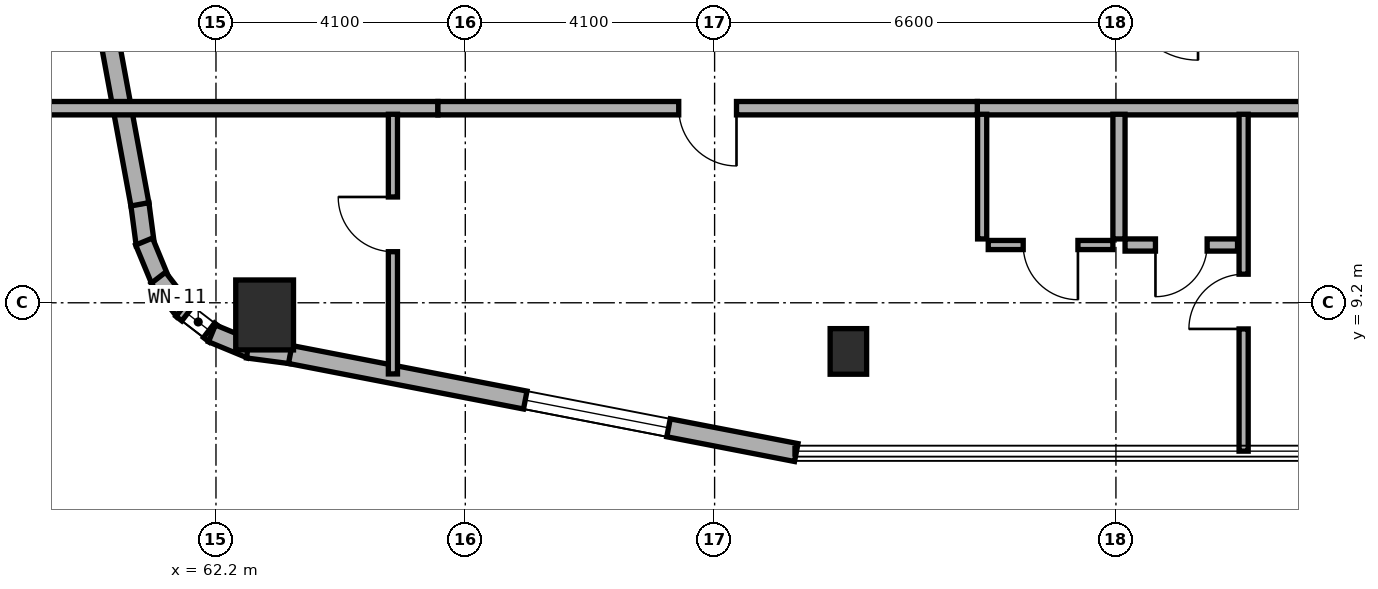
"""IFC4 building model, lengths in metres.
Left out: names, types, materials, properties, quantities, classifications, styles, units other than length and angle.
Written with IfcOpenShell. Run it as: python <this file> out.ifc"""

import sys

from ifc_helpers import new_model, si_unit, direction, frame, frame_2d, origin, origin_2d, place, context, subcontext, project, spatial, rectangle, extrude, element, fill, save


model = new_model("IFC4")
c1 = context("Model", 3, precision=1e-05, world=origin(), true_north=direction((0.0, 1.0)))
c2 = subcontext(c1, "Body", "Model", "MODEL_VIEW")
j1 = project(units=[si_unit("LENGTHUNIT", "METRE"), si_unit("PLANEANGLEUNIT", "RADIAN")], contexts=[c1])
p1 = place(None, origin())
s1 = spatial("IfcSite", under=j1, at=p1, CompositionType="ELEMENT")
p2 = place(p1, origin())
s2 = spatial("IfcBuilding", under=s1, at=p2, CompositionType="ELEMENT")
p3 = place(p2, frame((0.0, 0.0, 83.5)))
s3 = spatial("IfcBuildingStorey", under=s2, at=p3, CompositionType="ELEMENT", Elevation=83.5)
p4 = place(p3, frame((72.6, 8.4, 0.0), z_axis=(0.0, 0.0, 1.0), x_axis=(1.0, 0.0, 0.0)))
e1 = element("IfcColumn", 1, at=p4, inside=s3, PredefinedType="COLUMN", context=c2, shape_type="SweptSolid", body=[
    extrude(rectangle(XDim=0.6, YDim=0.75, at=origin_2d()), origin(), (0.0, 0.0, 1.0), 3.5),
])
p5 = place(p3, frame((63.0, 9.0, 0.0), z_axis=(0.0, 0.0, 1.0), x_axis=(1.0, 0.0, 0.0)))
e2 = element("IfcColumn", 2, at=p5, inside=s3, PredefinedType="COLUMN", context=c2, shape_type="SweptSolid", body=[
    extrude(rectangle(XDim=0.95, YDim=1.15, at=origin_2d()), origin(), (0.0, 0.0, 1.0), 3.5),
])
p6 = place(p3, frame((60.948, 10.828, 0.0), z_axis=(0.0, 0.0, 1.0), x_axis=(0.131667498923, -0.991293937098, 0.0)))
e3 = element("IfcWall", 3, at=p6, inside=s3, PredefinedType="STANDARD", context=c2, shape_type="SweptSolid", body=[
    extrude(rectangle(XDim=0.677, YDim=0.3, at=frame_2d((0.338, 0.0))), origin(), (0.0, 0.0, 1.0), 3.25),
])
p7 = place(p3, frame((61.018, 10.207, 0.0), z_axis=(0.0, 0.0, 1.0), x_axis=(0.381864727877, -0.92421822618, 0.0)))
e4 = element("IfcWall", 4, at=p7, inside=s3, PredefinedType="STANDARD", context=c2, shape_type="SweptSolid", body=[
    extrude(rectangle(XDim=0.694, YDim=0.3, at=frame_2d((0.347, 0.0))), origin(), (0.0, 0.0, 1.0), 3.25),
])
p8 = place(p3, frame((61.252, 9.611, 0.0), z_axis=(0.0, 0.0, 1.0), x_axis=(0.609693758543, -0.792637067512, 0.0)))
e5 = element("IfcWall", 5, at=p8, inside=s3, PredefinedType="STANDARD", context=c2, shape_type="SweptSolid", body=[
    extrude(rectangle(XDim=0.694, YDim=0.3, at=frame_2d((0.347, 0.0))), origin(), (0.0, 0.0, 1.0), 3.25),
])
p9 = place(p3, frame((61.633, 9.096, 0.0), z_axis=(0.0, 0.0, 1.0), x_axis=(0.792807092876, -0.609472651958, 0.0)))
e6 = element("IfcWall", 6, at=p9, inside=s3, PredefinedType="STANDARD", context=c2, shape_type="SweptSolid", body=[
    extrude(rectangle(XDim=0.694, YDim=0.3, at=frame_2d((0.347, 0.0))), origin(), (0.0, 0.0, 1.0), 3.25),
])
p10 = place(p9, frame((0.122, 0.0, 0.85)))
e7 = element("IfcOpeningElement", 7, at=p10, cuts=e6, PredefinedType="OPENING", context=c2, shape_type="SweptSolid", body=[
    extrude(rectangle(XDim=0.45, YDim=1.5, at=frame_2d((0.225, 0.75))), frame((0.0, 0.16, 0.0), z_axis=(0.0, -1.0, 0.0), x_axis=(1.0, 0.0, 0.0)), (0.0, 0.0, 1.0), 0.32),
])
p11 = place(p3, frame((62.134, 8.697, 0.0), z_axis=(0.0, 0.0, 1.0), x_axis=(0.924042561464, -0.382289608286, 0.0)))
e8 = element("IfcWall", 8, at=p11, inside=s3, PredefinedType="STANDARD", context=c2, shape_type="SweptSolid", body=[
    extrude(rectangle(XDim=0.694, YDim=0.3, at=frame_2d((0.347, 0.0))), origin(), (0.0, 0.0, 1.0), 3.25),
])
p12 = place(p3, frame((62.722, 8.441, 0.0), z_axis=(0.0, 0.0, 1.0), x_axis=(0.991433279471, -0.130614135366, 0.0)))
e9 = element("IfcWall", 9, at=p12, inside=s3, PredefinedType="STANDARD", context=c2, shape_type="SweptSolid", body=[
    extrude(rectangle(XDim=0.712, YDim=0.3, at=frame_2d((0.356, 0.0))), origin(), (0.0, 0.0, 1.0), 3.25),
])
p13 = place(p3, frame((63.421, 8.349, 0.0), z_axis=(0.0, 0.0, 1.0), x_axis=(0.981750199588, -0.190175039396, 0.0)))
e10 = element("IfcWall", 10, at=p13, inside=s3, PredefinedType="STANDARD", context=c2, shape_type="SweptSolid", body=[
    extrude(rectangle(XDim=8.477, YDim=0.3, at=frame_2d((4.238, 0.0))), origin(), (0.0, 0.0, 1.0), 3.25),
])
p14 = place(p13, frame((3.937, 0.0, 0.8)))
e11 = element("IfcOpeningElement", 11, at=p14, cuts=e10, PredefinedType="OPENING", context=c2, shape_type="SweptSolid", body=[
    extrude(rectangle(XDim=2.4, YDim=1.6, at=frame_2d((1.2, 0.8))), frame((0.0, 0.16, 0.0), z_axis=(0.0, -1.0, 0.0), x_axis=(1.0, 0.0, 0.0)), (0.0, 0.0, 1.0), 0.32),
])
p15 = place(p3, frame((59.338, 19.561, 0.0), z_axis=(0.0, 0.0, 1.0), x_axis=(0.181241420611, -0.983438634311, 0.0)))
e12 = element("IfcWall", 12, at=p15, inside=s3, PredefinedType="STANDARD", context=c2, shape_type="SweptSolid", body=[
    extrude(rectangle(XDim=8.889, YDim=0.3, at=frame_2d((4.445, 0.0))), origin(), (0.0, 0.0, 1.0), 3.25),
])
p16 = place(p15, frame((1.497, 0.0, 0.8)))
e13 = element("IfcOpeningElement", 13, at=p16, cuts=e12, PredefinedType="OPENING", context=c2, shape_type="SweptSolid", body=[
    extrude(rectangle(XDim=2.4, YDim=1.6, at=frame_2d((1.2, 0.8))), frame((0.0, 0.16, 0.0), z_axis=(0.0, -1.0, 0.0), x_axis=(1.0, 0.0, 0.0)), (0.0, 0.0, 1.0), 0.32),
])
p17 = place(p3, frame((59.36, 12.4, 0.0), z_axis=(0.0, 0.0, 1.0), x_axis=(1.0, 0.0, 0.0)))
e14 = element("IfcWall", 14, at=p17, inside=s3, PredefinedType="SOLIDWALL", context=c2, shape_type="SweptSolid", body=[
    extrude(rectangle(XDim=6.49, YDim=0.22, at=frame_2d((3.245, 0.0))), origin(), (0.0, 0.0, 1.0), 2.945),
])
p18 = place(p3, frame((74.72, 12.4, 0.0), z_axis=(0.0, 0.0, 1.0), x_axis=(1.0, 0.0, 0.0)))
e15 = element("IfcWall", 15, at=p18, inside=s3, PredefinedType="SOLIDWALL", context=c2, shape_type="SweptSolid", body=[
    extrude(rectangle(XDim=6.68, YDim=0.22, at=frame_2d((3.34, 0.0))), origin(), (0.0, 0.0, 1.0), 2.825),
])
p19 = place(p3, frame((65.85, 12.4, 0.0), z_axis=(0.0, 0.0, 1.0), x_axis=(1.0, 0.0, 0.0)))
e16 = element("IfcWall", 16, at=p19, inside=s3, PredefinedType="SOLIDWALL", context=c2, shape_type="SweptSolid", body=[
    extrude(rectangle(XDim=8.87, YDim=0.22, at=frame_2d((4.435, 0.0))), origin(), (0.0, 0.0, 1.0), 2.825),
])
p20 = place(p19, frame((3.96, 0.0, 0.0)))
e17 = element("IfcOpeningElement", 17, at=p20, cuts=e16, PredefinedType="OPENING", context=c2, shape_type="SweptSolid", body=[
    extrude(rectangle(XDim=0.95, YDim=2.1, at=frame_2d((0.475, 1.05))), frame((0.0, 0.12, 0.0), z_axis=(0.0, -1.0, 0.0), x_axis=(1.0, 0.0, 0.0)), (0.0, 0.0, 1.0), 0.24),
])
p21 = place(p3, frame((65.11, 8.03, 0.0), z_axis=(0.0, 0.0, 1.0), x_axis=(0.0, 1.0, 0.0)))
e18 = element("IfcWall", 18, at=p21, inside=s3, PredefinedType="PARTITIONING", context=c2, shape_type="SweptSolid", body=[
    extrude(rectangle(XDim=4.27, YDim=0.15, at=frame_2d((2.135, 0.0))), origin(), (0.0, 0.0, 1.0), 2.945),
])
p22 = place(p21, frame((2.01, 0.0, 0.0)))
e19 = element("IfcOpeningElement", 19, at=p22, cuts=e18, PredefinedType="OPENING", context=c2, shape_type="SweptSolid", body=[
    extrude(rectangle(XDim=0.9, YDim=2.1, at=frame_2d((0.45, 1.05))), frame((0.0, 0.085, 0.0), z_axis=(0.0, -1.0, 0.0), x_axis=(1.0, 0.0, 0.0)), (0.0, 0.0, 1.0), 0.17),
])
p23 = place(p3, frame((79.1, 6.76, 0.0), z_axis=(0.0, 0.0, 1.0), x_axis=(0.0, 1.0, 0.0)))
e20 = element("IfcWall", 20, at=p23, inside=s3, PredefinedType="PARTITIONING", context=c2, shape_type="SweptSolid", body=[
    extrude(rectangle(XDim=5.54, YDim=0.15, at=frame_2d((2.77, 0.0))), origin(), (0.0, 0.0, 1.0), 2.865),
])
p24 = place(p23, frame((2.01, 0.0, 0.0)))
e21 = element("IfcOpeningElement", 21, at=p24, cuts=e20, PredefinedType="OPENING", context=c2, shape_type="SweptSolid", body=[
    extrude(rectangle(XDim=0.9, YDim=2.1, at=frame_2d((0.45, 1.05))), frame((0.0, 0.085, 0.0), z_axis=(0.0, -1.0, 0.0), x_axis=(1.0, 0.0, 0.0)), (0.0, 0.0, 1.0), 0.17),
])
p25 = place(p3, frame((77.05, 10.25, 0.0), z_axis=(0.0, 0.0, 1.0), x_axis=(0.0, 1.0, 0.0)))
e22 = element("IfcWall", 22, at=p25, inside=s3, PredefinedType="PLUMBINGWALL", context=c2, shape_type="SweptSolid", body=[
    extrude(rectangle(XDim=2.05, YDim=0.2, at=frame_2d((1.025, 0.0))), origin(), (0.0, 0.0, 1.0), 2.865),
])
p26 = place(p3, frame((74.8, 10.25, 0.0), z_axis=(0.0, 0.0, 1.0), x_axis=(0.0, 1.0, 0.0)))
e23 = element("IfcWall", 23, at=p26, inside=s3, PredefinedType="PARTITIONING", context=c2, shape_type="SweptSolid", body=[
    extrude(rectangle(XDim=2.05, YDim=0.15, at=frame_2d((1.025, 0.0))), origin(), (0.0, 0.0, 1.0), 2.865),
])
p27 = place(p3, frame((77.15, 10.15, 0.0), z_axis=(0.0, 0.0, 1.0), x_axis=(1.0, 0.0, 0.0)))
e24 = element("IfcWall", 24, at=p27, inside=s3, PredefinedType="PLUMBINGWALL", context=c2, shape_type="SweptSolid", body=[
    extrude(rectangle(XDim=1.85, YDim=0.2, at=frame_2d((0.925, 0.0))), origin(), (0.0, 0.0, 1.0), 3.22),
])
p28 = place(p27, frame((0.5, 0.0, 0.0)))
e25 = element("IfcOpeningElement", 25, at=p28, cuts=e24, PredefinedType="OPENING", context=c2, shape_type="SweptSolid", body=[
    extrude(rectangle(XDim=0.85, YDim=2.1, at=frame_2d((0.425, 1.05))), frame((0.0, 0.11, 0.0), z_axis=(0.0, -1.0, 0.0), x_axis=(1.0, 0.0, 0.0)), (0.0, 0.0, 1.0), 0.22),
])
p29 = place(p3, frame((74.9, 10.15, 0.0), z_axis=(0.0, 0.0, 1.0), x_axis=(1.0, 0.0, 0.0)))
e26 = element("IfcWall", 26, at=p29, inside=s3, PredefinedType="PARTITIONING", context=c2, shape_type="SweptSolid", body=[
    extrude(rectangle(XDim=2.05, YDim=0.15, at=frame_2d((1.025, 0.0))), origin(), (0.0, 0.0, 1.0), 3.22),
])
p30 = place(p29, frame((0.575, 0.0, 0.0)))
e27 = element("IfcOpeningElement", 27, at=p30, cuts=e26, PredefinedType="OPENING", context=c2, shape_type="SweptSolid", body=[
    extrude(rectangle(XDim=0.9, YDim=2.1, at=frame_2d((0.45, 1.05))), frame((0.0, 0.085, 0.0), z_axis=(0.0, -1.0, 0.0), x_axis=(1.0, 0.0, 0.0)), (0.0, 0.0, 1.0), 0.17),
])
p31 = place(p14, origin())
e28 = element("IfcWindow", 28, at=p31, inside=s3, PartitioningType="SINGLE_PANEL", PredefinedType="WINDOW", context=c2, shape_type="SweptSolid", body=[
    extrude(rectangle(XDim=2.4, YDim=1.6, at=frame_2d((1.2, 0.8))), frame((0.0, 0.03, 0.0), z_axis=(0.0, -1.0, 0.0), x_axis=(1.0, 0.0, 0.0)), (0.0, 0.0, 1.0), 0.06),
])
fill(e11, e28)
p32 = place(p10, origin())
e29 = element("IfcWindow", 29, at=p32, inside=s3, PartitioningType="SINGLE_PANEL", PredefinedType="WINDOW", context=c2, shape_type="SweptSolid", body=[
    extrude(rectangle(XDim=0.45, YDim=1.5, at=frame_2d((0.225, 0.75))), frame((0.0, 0.03, 0.0), z_axis=(0.0, -1.0, 0.0), x_axis=(1.0, 0.0, 0.0)), (0.0, 0.0, 1.0), 0.06),
])
fill(e7, e29)
p33 = place(p20, frame((0.95, 0.0, 0.0), z_axis=(0.0, 0.0, 1.0), x_axis=(-1.0, 0.0, 0.0)))
e30 = element("IfcDoor", 30, at=p33, inside=s3, OperationType="SINGLE_SWING_LEFT", PredefinedType="DOOR", context=c2, shape_type="SweptSolid", body=[
    extrude(rectangle(XDim=0.95, YDim=2.1, at=frame_2d((0.475, 1.05))), frame((0.0, 0.025, 0.0), z_axis=(0.0, -1.0, 0.0), x_axis=(1.0, 0.0, 0.0)), (0.0, 0.0, 1.0), 0.05),
])
fill(e17, e30)
p34 = place(p22, origin())
e31 = element("IfcDoor", 31, at=p34, inside=s3, OperationType="SINGLE_SWING_RIGHT", PredefinedType="DOOR", context=c2, shape_type="SweptSolid", body=[
    extrude(rectangle(XDim=0.9, YDim=2.1, at=frame_2d((0.45, 1.05))), frame((0.0, 0.025, 0.0), z_axis=(0.0, -1.0, 0.0), x_axis=(1.0, 0.0, 0.0)), (0.0, 0.0, 1.0), 0.05),
])
fill(e19, e31)
p35 = place(p24, origin())
e32 = element("IfcDoor", 32, at=p35, inside=s3, OperationType="SINGLE_SWING_LEFT", PredefinedType="DOOR", context=c2, shape_type="SweptSolid", body=[
    extrude(rectangle(XDim=0.9, YDim=2.1, at=frame_2d((0.45, 1.05))), frame((0.0, 0.025, 0.0), z_axis=(0.0, -1.0, 0.0), x_axis=(1.0, 0.0, 0.0)), (0.0, 0.0, 1.0), 0.05),
])
fill(e21, e32)
p36 = place(p28, frame((0.85, 0.0, 0.0), z_axis=(0.0, 0.0, 1.0), x_axis=(-1.0, 0.0, 0.0)))
e33 = element("IfcDoor", 33, at=p36, inside=s3, OperationType="SINGLE_SWING_RIGHT", PredefinedType="DOOR", context=c2, shape_type="SweptSolid", body=[
    extrude(rectangle(XDim=0.85, YDim=2.1, at=frame_2d((0.425, 1.05))), frame((0.0, 0.025, 0.0), z_axis=(0.0, -1.0, 0.0), x_axis=(1.0, 0.0, 0.0)), (0.0, 0.0, 1.0), 0.05),
])
fill(e25, e33)
p37 = place(p30, frame((0.9, 0.0, 0.0), z_axis=(0.0, 0.0, 1.0), x_axis=(-1.0, 0.0, 0.0)))
e34 = element("IfcDoor", 34, at=p37, inside=s3, OperationType="SINGLE_SWING_LEFT", PredefinedType="DOOR", context=c2, shape_type="SweptSolid", body=[
    extrude(rectangle(XDim=0.9, YDim=2.1, at=frame_2d((0.45, 1.05))), frame((0.0, 0.025, 0.0), z_axis=(0.0, -1.0, 0.0), x_axis=(1.0, 0.0, 0.0)), (0.0, 0.0, 1.0), 0.05),
])
fill(e27, e34)
save(model, sys.argv[1])
